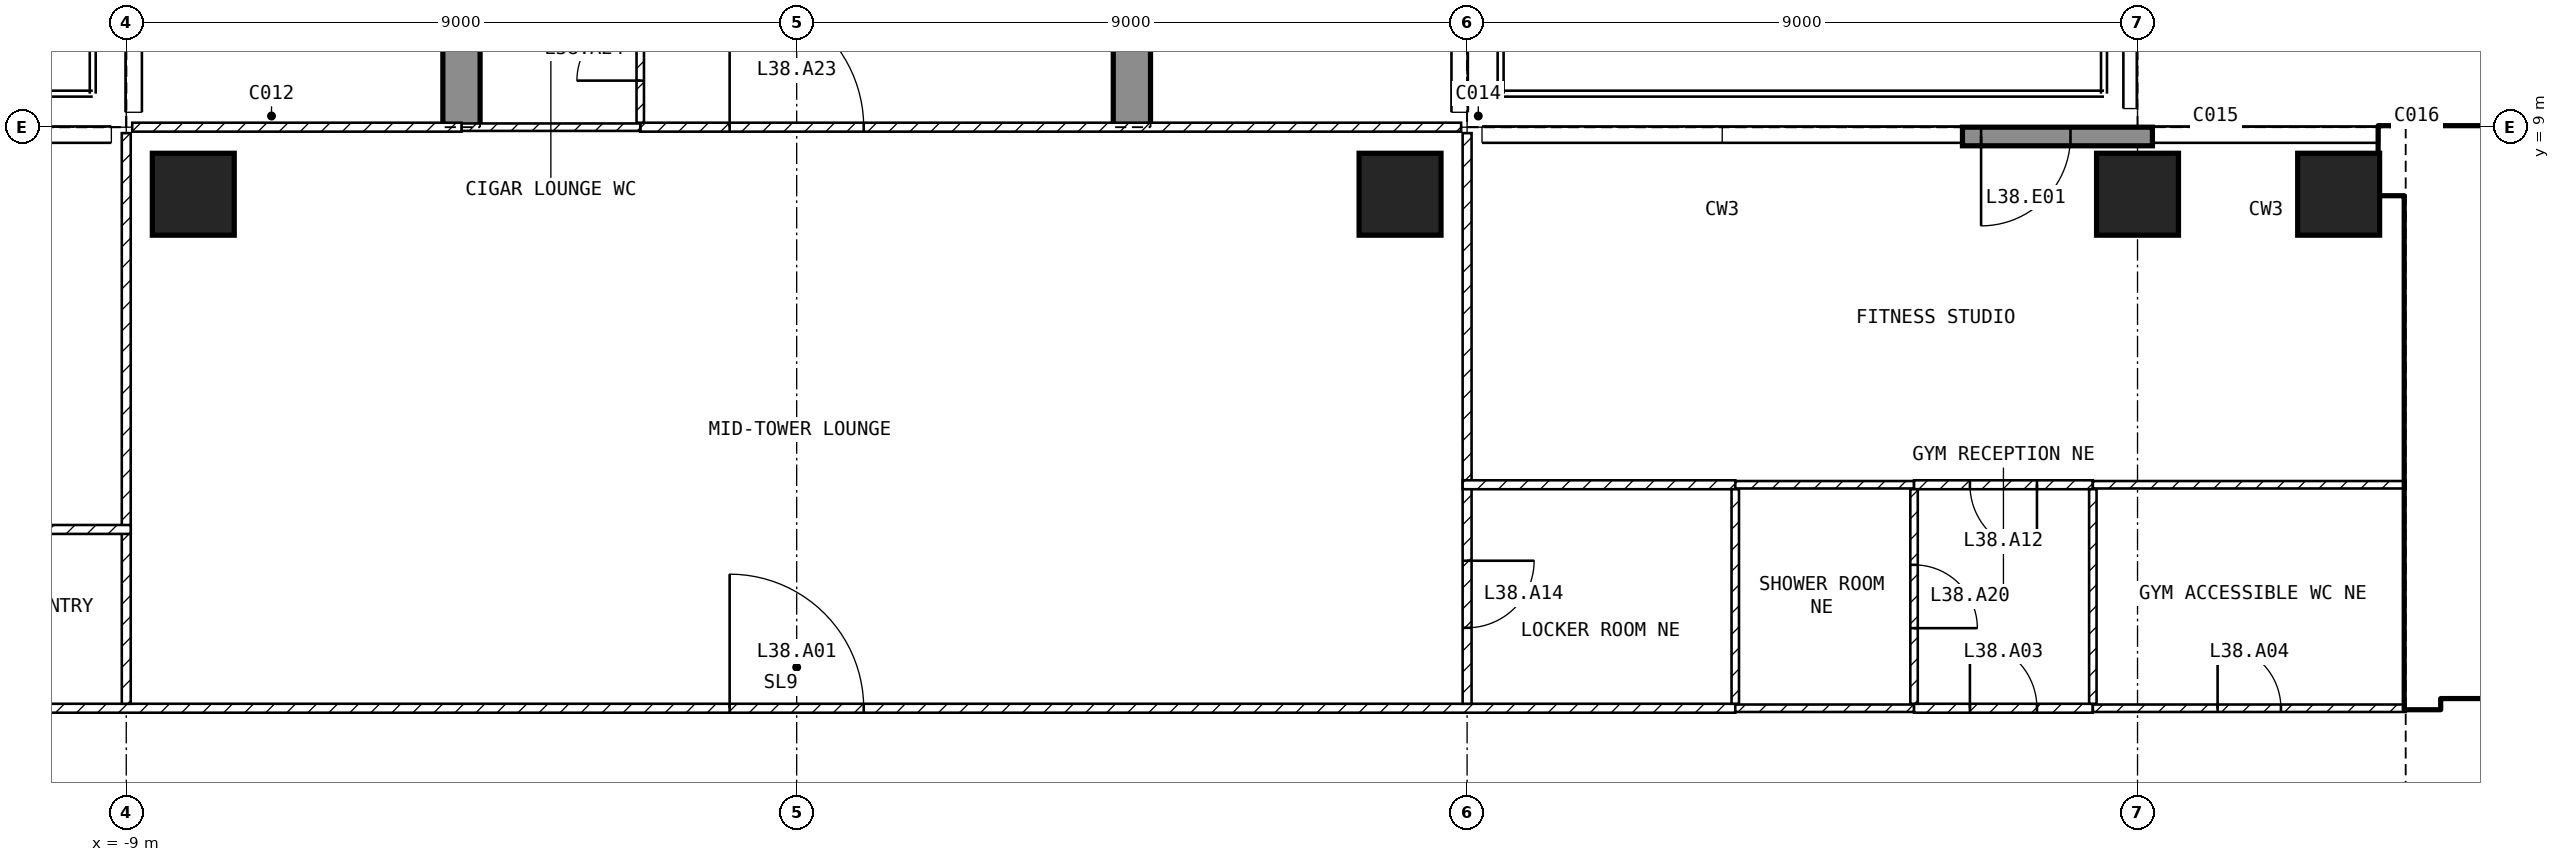
"""IFC4 building model, lengths in metres.
Left out: names, types, materials, properties, quantities, classifications, styles, units other than length and angle.
Written with IfcOpenShell. Run it as: python <this file> out.ifc"""

import sys

from ifc_helpers import new_model, si_unit, direction, frame, frame_2d, origin, origin_2d, place, context, subcontext, project, spatial, polyline, rectangle, outline, extrude, element, fill, save


model = new_model("IFC4")
c1 = context("Model", 3, precision=1e-05, world=origin(), true_north=direction((0.0, 1.0)))
c2 = subcontext(c1, "Body", "Model", "MODEL_VIEW")
j1 = project(units=[si_unit("LENGTHUNIT", "METRE"), si_unit("PLANEANGLEUNIT", "RADIAN")], contexts=[c1])
p1 = place(None, origin())
s1 = spatial("IfcSite", under=j1, at=p1, CompositionType="ELEMENT")
p2 = place(p1, origin())
s2 = spatial("IfcBuilding", under=s1, at=p2, CompositionType="ELEMENT")
p3 = place(p2, frame((0.0, 0.0, 154.9)))
s3 = spatial("IfcBuildingStorey", under=s2, at=p3, CompositionType="ELEMENT", Elevation=154.9)
for number, where, z_axis, x_axis in (
    (1, (-8.1, 8.1, -0.3), (0.0, 0.0, 1.0), (1.0, 0.0, 0.0)),
    (2, (8.1, 8.1, -0.3), (0.0, 0.0, 1.0), (1.0, 0.0, 0.0)),
    (3, (18.0, 8.1, -0.3), (0.0, 0.0, 1.0), (1.0, 0.0, 0.0)),
    (4, (20.7, 8.1, -0.3), (0.0, 0.0, 1.0), (1.0, 0.0, 0.0)),
):
    element("IfcColumn", number, at=place(p3, frame(where, z_axis=z_axis, x_axis=x_axis)), inside=s3, PredefinedType="COLUMN", context=c2, shape_type="SweptSolid", body=[
        extrude(rectangle(XDim=1.1, YDim=1.1, at=origin_2d()), origin(), (0.0, 0.0, 1.0), 7.05),
    ])
for number, where, z_axis, x_axis in (
    (5, (-4.75, 9.0, -0.3), (1.0, 0.0, 0.0), (0.0, 1.0, 0.0)),
    (6, (4.25, 9.0, -0.3), (1.0, 0.0, 0.0), (0.0, 1.0, 0.0)),
):
    element("IfcWall", number, at=place(p3, frame(where, z_axis=z_axis, x_axis=x_axis)), inside=s3, PredefinedType="SHEAR", context=c2, shape_type="SweptSolid", body=[
        extrude(outline(polyline([(0.0, 0.0), (2.1, 0.0), (2.1, 2.7), (4.5, 2.7), (4.5, 0.0), (9.9, 0.0), (9.9, 2.7), (12.3, 2.7), (12.3, 0.0), (16.55, 0.0), (16.55, 7.05), (0.0, 7.05), (0.0, 0.0)])), origin(), (0.0, 0.0, 1.0), 0.5),
    ])
p4 = place(p3, frame((18.2, 8.875, 0.0), z_axis=(0.0, 0.0, 1.0), x_axis=(-1.0, 0.0, 0.0)))
e7 = element("IfcWall", 7, at=p4, inside=s3, PredefinedType="SOLIDWALL", context=c2, shape_type="SweptSolid", body=[
    extrude(rectangle(XDim=2.55, YDim=0.25, at=frame_2d((1.275, 0.0))), origin(), (0.0, 0.0, 1.0), 6.75),
])
p5 = place(p4, frame((1.1, 0.0, 0.0)))
e8 = element("IfcOpeningElement", 8, at=p5, cuts=e7, PredefinedType="OPENING", context=c2, shape_type="SweptSolid", body=[
    extrude(rectangle(XDim=1.2, YDim=2.4, at=frame_2d((0.6, 1.2))), frame((0.0, 0.135, 0.0), z_axis=(0.0, -1.0, 0.0), x_axis=(1.0, 0.0, 0.0)), (0.0, 0.0, 1.0), 0.27),
])
p6 = place(p3, frame((21.25, 8.55, 0.0), z_axis=(0.0, 0.0, 1.0), x_axis=(1.0, 0.0, 0.0)))
e9 = element("IfcWall", 9, at=p6, inside=s3, PredefinedType="SHEAR", context=c2, shape_type="SweptSolid", body=[
    extrude(rectangle(XDim=8.2, YDim=0.9, at=frame_2d((4.1, 0.0))), origin(), (0.0, 0.0, 1.0), 6.75),
])
p7 = place(p3, frame((21.825, 1.2, 0.0), z_axis=(0.0, 0.0, 1.0), x_axis=(0.0, 1.0, 0.0)))
e10 = element("IfcWall", 10, at=p7, inside=s3, PredefinedType="SHEAR", context=c2, shape_type="SweptSolid", body=[
    extrude(rectangle(XDim=6.9, YDim=0.45, at=frame_2d((3.45, 0.0))), origin(), (0.0, 0.0, 1.0), 6.75),
])
p8 = place(p3, frame((22.05, 1.45, 0.0), z_axis=(0.0, 0.0, 1.0), x_axis=(1.0, 0.0, 0.0)))
e11 = element("IfcWall", 11, at=p8, inside=s3, PredefinedType="SOLIDWALL", context=c2, shape_type="SweptSolid", body=[
    extrude(rectangle(XDim=11.0, YDim=0.2, at=frame_2d((5.5, 0.0))), origin(), (0.0, 0.0, 1.0), 6.75),
])
p9 = place(p8, frame((0.75, 0.0, 0.0)))
e12 = element("IfcOpeningElement", 12, at=p9, cuts=e11, PredefinedType="OPENING", context=c2, shape_type="SweptSolid", body=[
    extrude(rectangle(XDim=1.0, YDim=2.1, at=frame_2d((0.5, 1.05))), frame((0.0, 0.11, 0.0), z_axis=(0.0, -1.0, 0.0), x_axis=(1.0, 0.0, 0.0)), (0.0, 0.0, 1.0), 0.22),
])
p10 = place(p8, frame((3.25, 0.0, 0.0)))
e13 = element("IfcOpeningElement", 13, at=p10, cuts=e11, PredefinedType="OPENING", context=c2, shape_type="SweptSolid", body=[
    extrude(rectangle(XDim=1.0, YDim=2.1, at=frame_2d((0.5, 1.05))), frame((0.0, 0.11, 0.0), z_axis=(0.0, -1.0, 0.0), x_axis=(1.0, 0.0, 0.0)), (0.0, 0.0, 1.0), 0.22),
])
p11 = place(p8, frame((9.075, 0.0, 0.0)))
e14 = element("IfcOpeningElement", 14, at=p11, cuts=e11, PredefinedType="OPENING", context=c2, shape_type="SweptSolid", body=[
    extrude(rectangle(XDim=0.9, YDim=2.1, at=frame_2d((0.45, 1.05))), frame((0.0, 0.11, 0.0), z_axis=(0.0, -1.0, 0.0), x_axis=(1.0, 0.0, 0.0)), (0.0, 0.0, 1.0), 0.22),
])
p12 = place(p3, frame((22.05, 5.15, 0.0), z_axis=(0.0, 0.0, 1.0), x_axis=(1.0, 0.0, 0.0)))
e15 = element("IfcWall", 15, at=p12, inside=s3, PredefinedType="SOLIDWALL", context=c2, shape_type="SweptSolid", body=[
    extrude(rectangle(XDim=6.3, YDim=0.2, at=frame_2d((3.15, 0.0))), origin(), (0.0, 0.0, 1.0), 6.75),
])
p13 = place(p12, frame((0.2, 0.0, 0.0)))
e16 = element("IfcOpeningElement", 16, at=p13, cuts=e15, PredefinedType="OPENING", context=c2, shape_type="SweptSolid", body=[
    extrude(rectangle(XDim=1.0, YDim=2.1, at=frame_2d((0.5, 1.05))), frame((0.0, 0.11, 0.0), z_axis=(0.0, -1.0, 0.0), x_axis=(1.0, 0.0, 0.0)), (0.0, 0.0, 1.0), 0.22),
])
p14 = place(p3, frame((-21.6, 1.2, 0.0), z_axis=(0.0, 0.0, 1.0), x_axis=(1.0, 0.0, 0.0)))
e17 = element("IfcWall", 17, at=p14, inside=s3, PredefinedType="PARTITIONING", context=c2, shape_type="SweptSolid", body=[
    extrude(rectangle(XDim=34.2, YDim=0.12, at=frame_2d((17.1, 0.0))), origin(), (0.0, 0.0, 1.0), 6.75),
])
p15 = place(p14, frame((20.7, 0.0, 0.0)))
e18 = element("IfcOpeningElement", 18, at=p15, cuts=e17, PredefinedType="OPENING", context=c2, shape_type="SweptSolid", body=[
    extrude(rectangle(XDim=1.8, YDim=2.1, at=frame_2d((0.9, 1.05))), frame((0.0, 0.07, 0.0), z_axis=(0.0, -1.0, 0.0), x_axis=(1.0, 0.0, 0.0)), (0.0, 0.0, 1.0), 0.14),
])
p16 = place(p14, frame((6.45, 0.0, 0.0)))
e19 = element("IfcOpeningElement", 19, at=p16, cuts=e17, PredefinedType="OPENING", context=c2, shape_type="SweptSolid", body=[
    extrude(rectangle(XDim=0.9, YDim=2.1, at=frame_2d((0.45, 1.05))), frame((0.0, 0.07, 0.0), z_axis=(0.0, -1.0, 0.0), x_axis=(1.0, 0.0, 0.0)), (0.0, 0.0, 1.0), 0.14),
])
p17 = place(p3, frame((12.6, 1.2, 0.0), z_axis=(0.0, 0.0, 1.0), x_axis=(1.0, 0.0, 0.0)))
e20 = element("IfcWall", 20, at=p17, inside=s3, PredefinedType="PARTITIONING", context=c2, shape_type="SweptSolid", body=[
    extrude(rectangle(XDim=2.4, YDim=0.1, at=frame_2d((1.2, 0.0))), origin(), (0.0, 0.0, 1.0), 6.75),
])
p18 = place(p3, frame((15.0, 1.2, 0.0), z_axis=(0.0, 0.0, 1.0), x_axis=(1.0, 0.0, 0.0)))
e21 = element("IfcWall", 21, at=p18, inside=s3, PredefinedType="PARTITIONING", context=c2, shape_type="SweptSolid", body=[
    extrude(rectangle(XDim=2.4, YDim=0.12, at=frame_2d((1.2, 0.0))), origin(), (0.0, 0.0, 1.0), 6.75),
])
p19 = place(p18, frame((0.75, 0.0, 0.0)))
e22 = element("IfcOpeningElement", 22, at=p19, cuts=e21, PredefinedType="OPENING", context=c2, shape_type="SweptSolid", body=[
    extrude(rectangle(XDim=0.9, YDim=2.1, at=frame_2d((0.45, 1.05))), frame((0.0, 0.07, 0.0), z_axis=(0.0, -1.0, 0.0), x_axis=(1.0, 0.0, 0.0)), (0.0, 0.0, 1.0), 0.14),
])
p20 = place(p3, frame((17.4, 1.2, 0.0), z_axis=(0.0, 0.0, 1.0), x_axis=(1.0, 0.0, 0.0)))
e23 = element("IfcWall", 23, at=p20, inside=s3, PredefinedType="PARTITIONING", context=c2, shape_type="SweptSolid", body=[
    extrude(rectangle(XDim=4.2, YDim=0.1, at=frame_2d((2.1, 0.0))), origin(), (0.0, 0.0, 1.0), 6.75),
])
p21 = place(p20, frame((1.675, 0.0, 0.0)))
e24 = element("IfcOpeningElement", 24, at=p21, cuts=e23, PredefinedType="OPENING", context=c2, shape_type="SweptSolid", body=[
    extrude(rectangle(XDim=0.85, YDim=2.1, at=frame_2d((0.425, 1.05))), frame((0.0, 0.06, 0.0), z_axis=(0.0, -1.0, 0.0), x_axis=(1.0, 0.0, 0.0)), (0.0, 0.0, 1.0), 0.12),
])
p22 = place(p3, frame((9.0, 8.92, 0.0), z_axis=(0.0, 0.0, 1.0), x_axis=(0.0, -1.0, 0.0)))
e25 = element("IfcWall", 25, at=p22, inside=s3, PredefinedType="PARTITIONING", context=c2, shape_type="SweptSolid", body=[
    extrude(rectangle(XDim=7.66, YDim=0.12, at=frame_2d((3.83, 0.0))), origin(), (0.0, 0.0, 1.0), 6.75),
])
p23 = place(p22, frame((5.74, 0.0, 0.0)))
e26 = element("IfcOpeningElement", 26, at=p23, cuts=e25, PredefinedType="OPENING", context=c2, shape_type="SweptSolid", body=[
    extrude(rectangle(XDim=0.9, YDim=2.1, at=frame_2d((0.45, 1.05))), frame((0.0, 0.07, 0.0), z_axis=(0.0, -1.0, 0.0), x_axis=(1.0, 0.0, 0.0)), (0.0, 0.0, 1.0), 0.14),
])
p24 = place(p3, frame((-9.0, 1.26, 0.0), z_axis=(0.0, 0.0, 1.0), x_axis=(0.0, 1.0, 0.0)))
e27 = element("IfcWall", 27, at=p24, inside=s3, PredefinedType="PARTITIONING", context=c2, shape_type="SweptSolid", body=[
    extrude(rectangle(XDim=7.66, YDim=0.12, at=frame_2d((3.83, 0.0))), origin(), (0.0, 0.0, 1.0), 6.75),
])
p25 = place(p3, frame((-2.1, 9.0, 0.0), z_axis=(0.0, 0.0, 1.0), x_axis=(1.0, 0.0, 0.0)))
e28 = element("IfcWall", 28, at=p25, inside=s3, PredefinedType="PARTITIONING", context=c2, shape_type="SweptSolid", body=[
    extrude(rectangle(XDim=11.02, YDim=0.12, at=frame_2d((5.51, 0.0))), origin(), (0.0, 0.0, 1.0), 6.75),
])
p26 = place(p25, frame((1.2, 0.0, 0.0)))
e29 = element("IfcOpeningElement", 29, at=p26, cuts=e28, PredefinedType="OPENING", context=c2, shape_type="SweptSolid", body=[
    extrude(rectangle(XDim=1.8, YDim=2.1, at=frame_2d((0.9, 1.05))), frame((0.0, 0.07, 0.0), z_axis=(0.0, -1.0, 0.0), x_axis=(1.0, 0.0, 0.0)), (0.0, 0.0, 1.0), 0.14),
])
p27 = place(p3, frame((-4.5, 9.0, 0.0), z_axis=(0.0, 0.0, 1.0), x_axis=(1.0, 0.0, 0.0)))
e30 = element("IfcWall", 30, at=p27, inside=s3, PredefinedType="PARTITIONING", context=c2, shape_type="SweptSolid", body=[
    extrude(rectangle(XDim=2.4, YDim=0.1, at=frame_2d((1.2, 0.0))), origin(), (0.0, 0.0, 1.0), 6.75),
])
p28 = place(p3, frame((-8.92, 9.0, 0.0), z_axis=(0.0, 0.0, 1.0), x_axis=(1.0, 0.0, 0.0)))
e31 = element("IfcWall", 31, at=p28, inside=s3, PredefinedType="PARTITIONING", context=c2, shape_type="SweptSolid", body=[
    extrude(rectangle(XDim=4.42, YDim=0.12, at=frame_2d((2.21, 0.0))), origin(), (0.0, 0.0, 1.0), 6.75),
])
p29 = place(p3, frame((12.6, 4.2, 0.0), z_axis=(0.0, 0.0, 1.0), x_axis=(-1.0, 0.0, 0.0)))
e32 = element("IfcWall", 32, at=p29, inside=s3, PredefinedType="PARTITIONING", context=c2, shape_type="SweptSolid", body=[
    extrude(rectangle(XDim=3.66, YDim=0.12, at=frame_2d((1.83, 0.0))), origin(), (0.0, 0.0, 1.0), 6.75),
])
p30 = place(p3, frame((15.0, 4.2, 0.0), z_axis=(0.0, 0.0, 1.0), x_axis=(-1.0, 0.0, 0.0)))
e33 = element("IfcWall", 33, at=p30, inside=s3, PredefinedType="PARTITIONING", context=c2, shape_type="SweptSolid", body=[
    extrude(rectangle(XDim=2.4, YDim=0.1, at=frame_2d((1.2, 0.0))), origin(), (0.0, 0.0, 1.0), 6.75),
])
p31 = place(p3, frame((17.4, 4.2, 0.0), z_axis=(0.0, 0.0, 1.0), x_axis=(-1.0, 0.0, 0.0)))
e34 = element("IfcWall", 34, at=p31, inside=s3, PredefinedType="PARTITIONING", context=c2, shape_type="SweptSolid", body=[
    extrude(rectangle(XDim=2.4, YDim=0.12, at=frame_2d((1.2, 0.0))), origin(), (0.0, 0.0, 1.0), 6.75),
])
p32 = place(p31, frame((0.75, 0.0, 0.0)))
e35 = element("IfcOpeningElement", 35, at=p32, cuts=e34, PredefinedType="OPENING", context=c2, shape_type="SweptSolid", body=[
    extrude(rectangle(XDim=0.9, YDim=2.1, at=frame_2d((0.45, 1.05))), frame((0.0, 0.07, 0.0), z_axis=(0.0, -1.0, 0.0), x_axis=(1.0, 0.0, 0.0)), (0.0, 0.0, 1.0), 0.14),
])
p33 = place(p3, frame((21.6, 4.2, 0.0), z_axis=(0.0, 0.0, 1.0), x_axis=(-1.0, 0.0, 0.0)))
e36 = element("IfcWall", 36, at=p33, inside=s3, PredefinedType="PARTITIONING", context=c2, shape_type="SweptSolid", body=[
    extrude(rectangle(XDim=4.2, YDim=0.1, at=frame_2d((2.1, 0.0))), origin(), (0.0, 0.0, 1.0), 6.75),
])
p34 = place(p3, frame((12.6, 4.14, 0.0), z_axis=(0.0, 0.0, 1.0), x_axis=(0.0, -1.0, 0.0)))
e37 = element("IfcWall", 37, at=p34, inside=s3, PredefinedType="PARTITIONING", context=c2, shape_type="SweptSolid", body=[
    extrude(rectangle(XDim=2.88, YDim=0.1, at=frame_2d((1.44, 0.0))), origin(), (0.0, 0.0, 1.0), 6.75),
])
p35 = place(p3, frame((15.0, 4.14, 0.0), z_axis=(0.0, 0.0, 1.0), x_axis=(0.0, -1.0, 0.0)))
e38 = element("IfcWall", 38, at=p35, inside=s3, PredefinedType="PARTITIONING", context=c2, shape_type="SweptSolid", body=[
    extrude(rectangle(XDim=2.88, YDim=0.1, at=frame_2d((1.44, 0.0))), origin(), (0.0, 0.0, 1.0), 6.75),
])
p36 = place(p35, frame((1.015, 0.0, 0.0)))
e39 = element("IfcOpeningElement", 39, at=p36, cuts=e38, PredefinedType="OPENING", context=c2, shape_type="SweptSolid", body=[
    extrude(rectangle(XDim=0.85, YDim=2.1, at=frame_2d((0.425, 1.05))), frame((0.0, 0.06, 0.0), z_axis=(0.0, -1.0, 0.0), x_axis=(1.0, 0.0, 0.0)), (0.0, 0.0, 1.0), 0.12),
])
p37 = place(p3, frame((17.4, 4.14, 0.0), z_axis=(0.0, 0.0, 1.0), x_axis=(0.0, -1.0, 0.0)))
e40 = element("IfcWall", 40, at=p37, inside=s3, PredefinedType="PARTITIONING", context=c2, shape_type="SweptSolid", body=[
    extrude(rectangle(XDim=2.88, YDim=0.1, at=frame_2d((1.44, 0.0))), origin(), (0.0, 0.0, 1.0), 6.75),
])
p38 = place(p3, frame((-8.94, 3.6, 0.0), z_axis=(0.0, 0.0, 1.0), x_axis=(-1.0, 0.0, 0.0)))
e41 = element("IfcWall", 41, at=p38, inside=s3, PredefinedType="PARTITIONING", context=c2, shape_type="SweptSolid", body=[
    extrude(rectangle(XDim=12.66, YDim=0.12, at=frame_2d((6.33, 0.0))), origin(), (0.0, 0.0, 1.0), 6.75),
])
p39 = place(p38, frame((10.41, 0.0, 0.0)))
e42 = element("IfcOpeningElement", 42, at=p39, cuts=e41, PredefinedType="OPENING", context=c2, shape_type="SweptSolid", body=[
    extrude(rectangle(XDim=0.9, YDim=2.1, at=frame_2d((0.45, 1.05))), frame((0.0, 0.07, 0.0), z_axis=(0.0, -1.0, 0.0), x_axis=(1.0, 0.0, 0.0)), (0.0, 0.0, 1.0), 0.14),
])
p40 = place(p38, frame((5.31, 0.0, 0.0)))
e43 = element("IfcOpeningElement", 43, at=p40, cuts=e41, PredefinedType="OPENING", context=c2, shape_type="SweptSolid", body=[
    extrude(rectangle(XDim=0.9, YDim=2.1, at=frame_2d((0.45, 1.05))), frame((0.0, 0.07, 0.0), z_axis=(0.0, -1.0, 0.0), x_axis=(1.0, 0.0, 0.0)), (0.0, 0.0, 1.0), 0.14),
])
p41 = place(p3, frame((-2.1, 9.06, 0.0), z_axis=(0.0, 0.0, 1.0), x_axis=(0.0, 1.0, 0.0)))
e44 = element("IfcWall", 44, at=p41, inside=s3, PredefinedType="PARTITIONING", context=c2, shape_type="SweptSolid", body=[
    extrude(rectangle(XDim=1.98, YDim=0.1, at=frame_2d((0.99, 0.0))), origin(), (0.0, 0.0, 1.0), 6.75),
])
p42 = place(p41, frame((0.565, 0.0, 0.0)))
e45 = element("IfcOpeningElement", 45, at=p42, cuts=e44, PredefinedType="OPENING", context=c2, shape_type="SweptSolid", body=[
    extrude(rectangle(XDim=0.85, YDim=2.1, at=frame_2d((0.425, 1.05))), frame((0.0, 0.06, 0.0), z_axis=(0.0, -1.0, 0.0), x_axis=(1.0, 0.0, 0.0)), (0.0, 0.0, 1.0), 0.12),
])
p43 = place(p5, origin())
e46 = element("IfcDoor", 46, at=p43, inside=s3, OperationType="SINGLE_SWING_RIGHT", PredefinedType="DOOR", context=c2, shape_type="SweptSolid", body=[
    extrude(rectangle(XDim=1.2, YDim=2.4, at=frame_2d((0.6, 1.2))), frame((0.0, 0.025, 0.0), z_axis=(0.0, -1.0, 0.0), x_axis=(1.0, 0.0, 0.0)), (0.0, 0.0, 1.0), 0.05),
])
fill(e8, e46)
p44 = place(p13, origin())
e47 = element("IfcDoor", 47, at=p44, inside=s3, OperationType="SINGLE_SWING_LEFT", PredefinedType="DOOR", context=c2, shape_type="SweptSolid", body=[
    extrude(rectangle(XDim=1.0, YDim=2.1, at=frame_2d((0.5, 1.05))), frame((0.0, 0.025, 0.0), z_axis=(0.0, -1.0, 0.0), x_axis=(1.0, 0.0, 0.0)), (0.0, 0.0, 1.0), 0.05),
])
fill(e16, e47)
p45 = place(p15, origin())
e48 = element("IfcDoor", 48, at=p45, inside=s3, OperationType="SINGLE_SWING_LEFT", PredefinedType="DOOR", context=c2, shape_type="SweptSolid", body=[
    extrude(rectangle(XDim=1.8, YDim=2.1, at=frame_2d((0.9, 1.05))), frame((0.0, 0.025, 0.0), z_axis=(0.0, -1.0, 0.0), x_axis=(1.0, 0.0, 0.0)), (0.0, 0.0, 1.0), 0.05),
])
fill(e18, e48)
p46 = place(p19, origin())
e49 = element("IfcDoor", 49, at=p46, inside=s3, OperationType="SINGLE_SWING_LEFT", PredefinedType="DOOR", context=c2, shape_type="SweptSolid", body=[
    extrude(rectangle(XDim=0.9, YDim=2.1, at=frame_2d((0.45, 1.05))), frame((0.0, 0.025, 0.0), z_axis=(0.0, -1.0, 0.0), x_axis=(1.0, 0.0, 0.0)), (0.0, 0.0, 1.0), 0.05),
])
fill(e22, e49)
p47 = place(p21, origin())
e50 = element("IfcDoor", 50, at=p47, inside=s3, OperationType="SINGLE_SWING_LEFT", PredefinedType="DOOR", context=c2, shape_type="SweptSolid", body=[
    extrude(rectangle(XDim=0.85, YDim=2.1, at=frame_2d((0.425, 1.05))), frame((0.0, 0.025, 0.0), z_axis=(0.0, -1.0, 0.0), x_axis=(1.0, 0.0, 0.0)), (0.0, 0.0, 1.0), 0.05),
])
fill(e24, e50)
p48 = place(p32, origin())
e51 = element("IfcDoor", 51, at=p48, inside=s3, OperationType="SINGLE_SWING_LEFT", PredefinedType="DOOR", context=c2, shape_type="SweptSolid", body=[
    extrude(rectangle(XDim=0.9, YDim=2.1, at=frame_2d((0.45, 1.05))), frame((0.0, 0.025, 0.0), z_axis=(0.0, -1.0, 0.0), x_axis=(1.0, 0.0, 0.0)), (0.0, 0.0, 1.0), 0.05),
])
fill(e35, e51)
p49 = place(p23, origin())
e52 = element("IfcDoor", 52, at=p49, inside=s3, OperationType="SINGLE_SWING_LEFT", PredefinedType="DOOR", context=c2, shape_type="SweptSolid", body=[
    extrude(rectangle(XDim=0.9, YDim=2.1, at=frame_2d((0.45, 1.05))), frame((0.0, 0.025, 0.0), z_axis=(0.0, -1.0, 0.0), x_axis=(1.0, 0.0, 0.0)), (0.0, 0.0, 1.0), 0.05),
])
fill(e26, e52)
p50 = place(p36, origin())
e53 = element("IfcDoor", 53, at=p50, inside=s3, OperationType="SINGLE_SWING_RIGHT", PredefinedType="DOOR", context=c2, shape_type="SweptSolid", body=[
    extrude(rectangle(XDim=0.85, YDim=2.1, at=frame_2d((0.425, 1.05))), frame((0.0, 0.025, 0.0), z_axis=(0.0, -1.0, 0.0), x_axis=(1.0, 0.0, 0.0)), (0.0, 0.0, 1.0), 0.05),
])
fill(e39, e53)
p51 = place(p26, origin())
e54 = element("IfcDoor", 54, at=p51, inside=s3, OperationType="SINGLE_SWING_LEFT", PredefinedType="DOOR", context=c2, shape_type="SweptSolid", body=[
    extrude(rectangle(XDim=1.8, YDim=2.1, at=frame_2d((0.9, 1.05))), frame((0.0, 0.025, 0.0), z_axis=(0.0, -1.0, 0.0), x_axis=(1.0, 0.0, 0.0)), (0.0, 0.0, 1.0), 0.05),
])
fill(e29, e54)
p52 = place(p42, origin())
e55 = element("IfcDoor", 55, at=p52, inside=s3, OperationType="SINGLE_SWING_LEFT", PredefinedType="DOOR", context=c2, shape_type="SweptSolid", body=[
    extrude(rectangle(XDim=0.85, YDim=2.1, at=frame_2d((0.425, 1.05))), frame((0.0, 0.025, 0.0), z_axis=(0.0, -1.0, 0.0), x_axis=(1.0, 0.0, 0.0)), (0.0, 0.0, 1.0), 0.05),
])
fill(e45, e55)
save(model, sys.argv[1])
